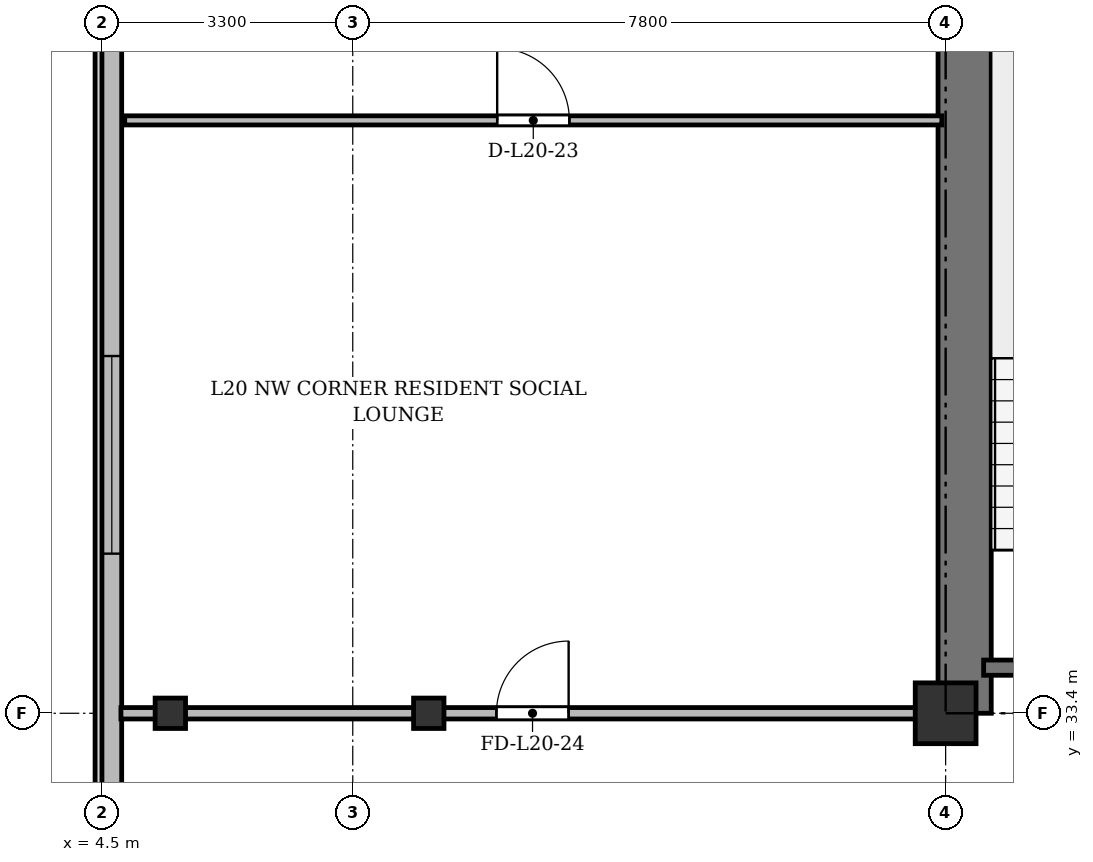
"""IFC4 building model, lengths in metres.
Left out: names, types, materials, properties, quantities, classifications, styles, units other than length and angle.
Written with IfcOpenShell. Run it as: python <this file> out.ifc"""

import sys

from ifc_helpers import new_model, si_unit, direction, frame, frame_2d, origin, origin_2d, place, context, subcontext, project, spatial, rectangle, i_section, extrude, source, transform, mapped, element, fill, save


model = new_model("IFC4")
c1 = context("Model", 3, precision=1e-05, world=origin(), true_north=direction((0.0, 1.0)))
c2 = subcontext(c1, "Body", "Model", "MODEL_VIEW")
j1 = project(units=[si_unit("LENGTHUNIT", "METRE"), si_unit("PLANEANGLEUNIT", "RADIAN")], contexts=[c1])
p1 = place(None, origin())
s1 = spatial("IfcSite", under=j1, at=p1, CompositionType="ELEMENT")
p2 = place(p1, origin())
s2 = spatial("IfcBuilding", under=s1, at=p2, CompositionType="ELEMENT")
p3 = place(p2, frame((0.0, 0.0, 81.7)))
s3 = spatial("IfcBuildingStorey", under=s2, at=p3, CompositionType="ELEMENT", Elevation=81.7)
m1 = source(origin(), c2, "Body", "SweptSolid", [
    extrude(i_section(OverallWidth=0.4, OverallDepth=0.4, WebThickness=0.022, FlangeThickness=0.035, at=origin_2d()), origin(), (0.0, 0.0, 1.0), 3.6),
])
for number, where, z_axis, x_axis in (
    (1, (5.4, 33.4, 0.0), (0.0, 0.0, 1.0), (1.0, 0.0, 0.0)),
    (2, (8.8, 33.4, 0.0), (0.0, 0.0, 1.0), (1.0, 0.0, 0.0)),
):
    element("IfcColumn", number, at=place(p3, frame(where, z_axis=z_axis, x_axis=x_axis)), inside=s3, PredefinedType="COLUMN", context=c2, shape_type="MappedRepresentation", body=[
        mapped(m1, transform((0.0, 0.0, 0.0), x_axis=(1.0, 0.0, 0.0), y_axis=(0.0, 1.0, 0.0), z_axis=(0.0, 0.0, 1.0), scale=1.0)),
    ])
m2 = source(origin(), c2, "Body", "SweptSolid", [
    extrude(rectangle(XDim=0.8, YDim=0.8, at=origin_2d()), origin(), (0.0, 0.0, 1.0), 3.6),
])
p4 = place(p3, frame((15.6, 33.4, 0.0), z_axis=(0.0, 0.0, 1.0), x_axis=(1.0, 0.0, 0.0)))
e3 = element("IfcColumn", 3, at=p4, inside=s3, PredefinedType="COLUMN", context=c2, shape_type="MappedRepresentation", body=[
    mapped(m2, transform((0.0, 0.0, 0.0), x_axis=(1.0, 0.0, 0.0), y_axis=(0.0, 1.0, 0.0), z_axis=(0.0, 0.0, 1.0), scale=1.0)),
])
p5 = place(p3, frame((4.63, 5.9, 0.0), z_axis=(0.0, 0.0, 1.0), x_axis=(0.0, 1.0, 0.0)))
e4 = element("IfcWall", 4, at=p5, inside=s3, PredefinedType="SOLIDWALL", context=c2, shape_type="SweptSolid", body=[
    extrude(rectangle(XDim=39.6, YDim=0.26, at=frame_2d((19.8, 0.0))), origin(), (0.0, 0.0, 1.0), 3.34),
])
p6 = place(p5, frame((1.45, 0.0, 0.92)))
e5 = element("IfcOpeningElement", 5, at=p6, cuts=e4, PredefinedType="OPENING", context=c2, shape_type="SweptSolid", body=[
    extrude(rectangle(XDim=1.2, YDim=1.65, at=frame_2d((0.6, 0.825))), frame((0.0, 0.14, 0.0), z_axis=(0.0, -1.0, 0.0), x_axis=(1.0, 0.0, 0.0)), (0.0, 0.0, 1.0), 0.28),
])
p7 = place(p5, frame((4.2, 0.0, 0.92)))
e6 = element("IfcOpeningElement", 6, at=p7, cuts=e4, PredefinedType="OPENING", context=c2, shape_type="SweptSolid", body=[
    extrude(rectangle(XDim=2.6, YDim=1.9, at=frame_2d((1.3, 0.95))), frame((0.0, 0.14, 0.0), z_axis=(0.0, -1.0, 0.0), x_axis=(1.0, 0.0, 0.0)), (0.0, 0.0, 1.0), 0.28),
])
p8 = place(p5, frame((8.4, 0.0, 0.92)))
e7 = element("IfcOpeningElement", 7, at=p8, cuts=e4, PredefinedType="OPENING", context=c2, shape_type="SweptSolid", body=[
    extrude(rectangle(XDim=2.6, YDim=1.9, at=frame_2d((1.3, 0.95))), frame((0.0, 0.14, 0.0), z_axis=(0.0, -1.0, 0.0), x_axis=(1.0, 0.0, 0.0)), (0.0, 0.0, 1.0), 0.28),
])
p9 = place(p5, frame((15.6, 0.0, 0.92)))
e8 = element("IfcOpeningElement", 8, at=p9, cuts=e4, PredefinedType="OPENING", context=c2, shape_type="SweptSolid", body=[
    extrude(rectangle(XDim=2.6, YDim=1.9, at=frame_2d((1.3, 0.95))), frame((0.0, 0.14, 0.0), z_axis=(0.0, -1.0, 0.0), x_axis=(1.0, 0.0, 0.0)), (0.0, 0.0, 1.0), 0.28),
])
p10 = place(p5, frame((29.6, 0.0, 0.92)))
e9 = element("IfcOpeningElement", 9, at=p10, cuts=e4, PredefinedType="OPENING", context=c2, shape_type="SweptSolid", body=[
    extrude(rectangle(XDim=2.6, YDim=1.9, at=frame_2d((1.3, 0.95))), frame((0.0, 0.14, 0.0), z_axis=(0.0, -1.0, 0.0), x_axis=(1.0, 0.0, 0.0)), (0.0, 0.0, 1.0), 0.28),
])
p11 = place(p5, frame((37.25, 0.0, 0.92)))
e10 = element("IfcOpeningElement", 10, at=p11, cuts=e4, PredefinedType="OPENING", context=c2, shape_type="SweptSolid", body=[
    extrude(rectangle(XDim=1.2, YDim=1.65, at=frame_2d((0.6, 0.825))), frame((0.0, 0.14, 0.0), z_axis=(0.0, -1.0, 0.0), x_axis=(1.0, 0.0, 0.0)), (0.0, 0.0, 1.0), 0.28),
])
p12 = place(p3, frame((15.85, 33.4, 0.0), z_axis=(0.0, 0.0, 1.0), x_axis=(0.0, 1.0, 0.0)))
e11 = element("IfcWall", 11, at=p12, inside=s3, PredefinedType="SHEAR", context=c2, shape_type="SweptSolid", body=[
    extrude(rectangle(XDim=11.7, YDim=0.7, at=frame_2d((5.85, 0.0))), origin(), (0.0, 0.0, 1.0), 3.34),
])
p13 = place(p3, frame((16.1, 34.0, 0.0), z_axis=(0.0, 0.0, 1.0), x_axis=(1.0, 0.0, 0.0)))
e12 = element("IfcWall", 12, at=p13, inside=s3, PredefinedType="SHEAR", context=c2, shape_type="SweptSolid", body=[
    extrude(rectangle(XDim=3.4, YDim=0.2, at=frame_2d((1.7, 0.0))), origin(), (0.0, 0.0, 1.0), 3.34),
])
p14 = place(p3, frame((4.8, 41.2, 0.0), z_axis=(0.0, 0.0, 1.0), x_axis=(1.0, 0.0, 0.0)))
e13 = element("IfcWall", 13, at=p14, inside=s3, PredefinedType="PARTITIONING", context=c2, shape_type="SweptSolid", body=[
    extrude(rectangle(XDim=10.75, YDim=0.12, at=frame_2d((5.375, 0.0))), origin(), (0.0, 0.0, 1.0), 2.84),
])
p15 = place(p14, frame((4.9, 0.0, 0.0)))
e14 = element("IfcOpeningElement", 14, at=p15, cuts=e13, PredefinedType="OPENING", context=c2, shape_type="SweptSolid", body=[
    extrude(rectangle(XDim=0.95, YDim=2.15, at=frame_2d((0.475, 1.075))), frame((0.0, 0.07, 0.0), z_axis=(0.0, -1.0, 0.0), x_axis=(1.0, 0.0, 0.0)), (0.0, 0.0, 1.0), 0.14),
])
p16 = place(p3, frame((4.75, 33.4, 0.0), z_axis=(0.0, 0.0, 1.0), x_axis=(1.0, 0.0, 0.0)))
e15 = element("IfcWall", 15, at=p16, inside=s3, PredefinedType="PARTITIONING", context=c2, shape_type="SweptSolid", body=[
    extrude(rectangle(XDim=10.85, YDim=0.15, at=frame_2d((5.425, 0.0))), origin(), (0.0, 0.0, 1.0), 2.752),
])
p17 = place(p16, frame((4.94, 0.0, 0.0)))
e16 = element("IfcOpeningElement", 16, at=p17, cuts=e15, PredefinedType="OPENING", context=c2, shape_type="SweptSolid", body=[
    extrude(rectangle(XDim=0.95, YDim=2.15, at=frame_2d((0.475, 1.075))), frame((0.0, 0.085, 0.0), z_axis=(0.0, -1.0, 0.0), x_axis=(1.0, 0.0, 0.0)), (0.0, 0.0, 1.0), 0.17),
])
m3 = source(origin(), c2, "Body", "SweptSolid", [
    extrude(rectangle(XDim=2.6, YDim=1.9, at=frame_2d((1.3, 0.95))), frame((0.0, 0.03, 0.0), z_axis=(0.0, -1.0, 0.0), x_axis=(1.0, 0.0, 0.0)), (0.0, 0.0, 1.0), 0.06),
])
p18 = place(p10, origin())
e17 = element("IfcWindow", 17, at=p18, inside=s3, PartitioningType="SINGLE_PANEL", PredefinedType="WINDOW", context=c2, shape_type="MappedRepresentation", body=[
    mapped(m3, transform((0.0, 0.0, 0.0), x_axis=(1.0, 0.0, 0.0), y_axis=(0.0, 1.0, 0.0), z_axis=(0.0, 0.0, 1.0), scale=1.0)),
])
fill(e9, e17)
m4 = source(origin(), c2, "Body", "SweptSolid", [
    extrude(rectangle(XDim=0.95, YDim=2.15, at=frame_2d((0.475, 1.075))), frame((0.0, 0.025, 0.0), z_axis=(0.0, -1.0, 0.0), x_axis=(1.0, 0.0, 0.0)), (0.0, 0.0, 1.0), 0.05),
])
p19 = place(p15, origin())
e18 = element("IfcDoor", 18, at=p19, inside=s3, OperationType="SINGLE_SWING_LEFT", PredefinedType="DOOR", context=c2, shape_type="MappedRepresentation", body=[
    mapped(m4, transform((0.0, 0.0, 0.0), x_axis=(1.0, 0.0, 0.0), y_axis=(0.0, 1.0, 0.0), z_axis=(0.0, 0.0, 1.0), scale=1.0)),
])
fill(e14, e18)
p20 = place(p17, origin())
e19 = element("IfcDoor", 19, at=p20, inside=s3, OperationType="SINGLE_SWING_RIGHT", PredefinedType="DOOR", context=c2, shape_type="MappedRepresentation", body=[
    mapped(m4, transform((0.0, 0.0, 0.0), x_axis=(1.0, 0.0, 0.0), y_axis=(0.0, 1.0, 0.0), z_axis=(0.0, 0.0, 1.0), scale=1.0)),
])
fill(e16, e19)
save(model, sys.argv[1])
